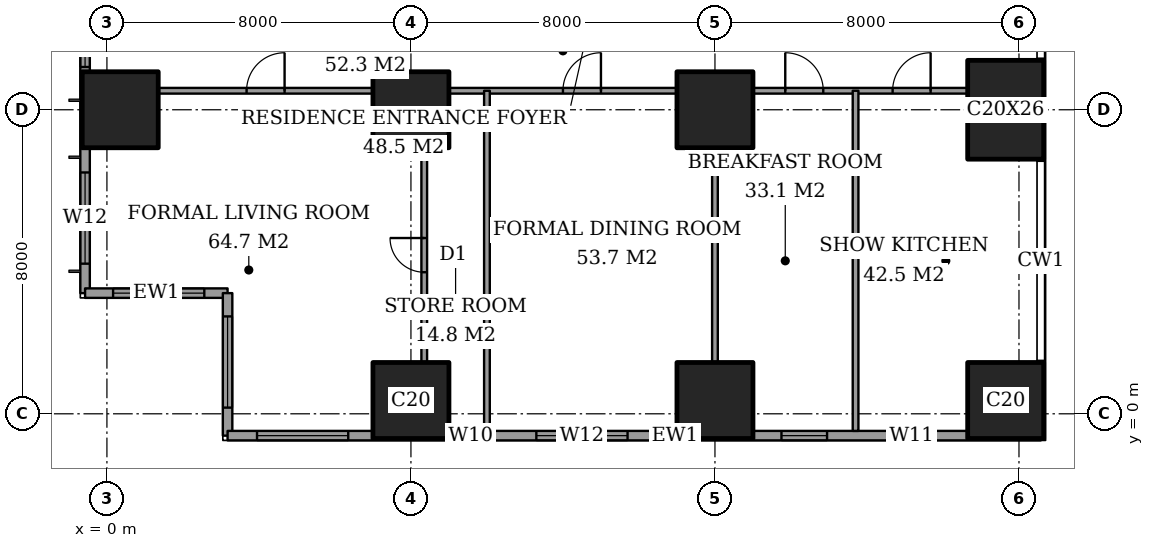
"""IFC4 building model, lengths in metres.
Left out: names, types, materials, properties, quantities, classifications, styles, units other than length and angle.
Written with IfcOpenShell. Run it as: python <this file> out.ifc"""

import sys

from ifc_helpers import new_model, si_unit, direction, frame, frame_2d, origin, origin_2d, place, context, subcontext, project, spatial, rectangle, extrude, element, fill, save


model = new_model("IFC4")
c1 = context("Model", 3, precision=1e-05, world=origin(), true_north=direction((0.0, 1.0)))
c2 = subcontext(c1, "Body", "Model", "MODEL_VIEW")
j1 = project(units=[si_unit("LENGTHUNIT", "METRE"), si_unit("PLANEANGLEUNIT", "RADIAN")], contexts=[c1])
p1 = place(None, origin())
s1 = spatial("IfcSite", under=j1, at=p1, CompositionType="ELEMENT")
p2 = place(p1, origin())
s2 = spatial("IfcBuilding", under=s1, at=p2, CompositionType="ELEMENT")
p3 = place(p2, frame((0.0, 0.0, 117.8)))
s3 = spatial("IfcBuildingStorey", under=s2, at=p3, CompositionType="ELEMENT", Elevation=117.8)
for number, where, z_axis, x_axis in (
    (1, (0.35, 8.0, 0.0), (0.0, 0.0, 1.0), (1.0, 0.0, 0.0)),
    (2, (8.0, 0.35, 0.0), (0.0, 0.0, 1.0), (1.0, 0.0, 0.0)),
    (3, (8.0, 8.0, 0.0), (0.0, 0.0, 1.0), (1.0, 0.0, 0.0)),
    (4, (16.0, 0.35, 0.0), (0.0, 0.0, 1.0), (1.0, 0.0, 0.0)),
    (5, (16.0, 8.0, 0.0), (0.0, 0.0, 1.0), (1.0, 0.0, 0.0)),
    (6, (23.65, 0.35, 0.0), (0.0, 0.0, 1.0), (1.0, 0.0, 0.0)),
):
    element("IfcColumn", number, at=place(p3, frame(where, z_axis=z_axis, x_axis=x_axis)), inside=s3, PredefinedType="COLUMN", context=c2, shape_type="SweptSolid", body=[
        extrude(rectangle(XDim=2.0, YDim=2.0, at=origin_2d()), origin(), (0.0, 0.0, 1.0), 3.6),
    ])
p4 = place(p3, frame((23.65, 8.0, 0.0), z_axis=(0.0, 0.0, 1.0), x_axis=(1.0, 0.0, 0.0)))
e7 = element("IfcColumn", 7, at=p4, inside=s3, PredefinedType="COLUMN", context=c2, shape_type="SweptSolid", body=[
    extrude(rectangle(XDim=2.0, YDim=2.6, at=origin_2d()), origin(), (0.0, 0.0, 1.0), 3.6),
])
p5 = place(p3, frame((-0.575, 44.825, 0.0), z_axis=(0.0, 0.0, 1.0), x_axis=(0.0, -1.0, 0.0)))
e8 = element("IfcWall", 8, at=p5, inside=s3, PredefinedType="SOLIDWALL", context=c2, shape_type="SweptSolid", body=[
    extrude(rectangle(XDim=41.65, YDim=0.25, at=frame_2d((20.825, 0.0))), origin(), (0.0, 0.0, 1.0), 3.6),
])
p6 = place(p5, frame((0.775, 0.0, 0.4)))
e9 = element("IfcOpeningElement", 9, at=p6, cuts=e8, PredefinedType="OPENING", context=c2, shape_type="SweptSolid", body=[
    extrude(rectangle(XDim=2.4, YDim=2.2, at=frame_2d((1.2, 1.1))), frame((0.0, 0.135, 0.0), z_axis=(0.0, -1.0, 0.0), x_axis=(1.0, 0.0, 0.0)), (0.0, 0.0, 1.0), 0.27),
])
p7 = place(p5, frame((6.1, 0.0, 0.4)))
e10 = element("IfcOpeningElement", 10, at=p7, cuts=e8, PredefinedType="OPENING", context=c2, shape_type="SweptSolid", body=[
    extrude(rectangle(XDim=1.2, YDim=2.2, at=frame_2d((0.6, 1.1))), frame((0.0, 0.135, 0.0), z_axis=(0.0, -1.0, 0.0), x_axis=(1.0, 0.0, 0.0)), (0.0, 0.0, 1.0), 0.27),
])
p8 = place(p5, frame((8.225, 0.0, 0.4)))
e11 = element("IfcOpeningElement", 11, at=p8, cuts=e8, PredefinedType="OPENING", context=c2, shape_type="SweptSolid", body=[
    extrude(rectangle(XDim=2.4, YDim=2.2, at=frame_2d((1.2, 1.1))), frame((0.0, 0.135, 0.0), z_axis=(0.0, -1.0, 0.0), x_axis=(1.0, 0.0, 0.0)), (0.0, 0.0, 1.0), 0.27),
])
p9 = place(p5, frame((15.625, 0.0, 0.4)))
e12 = element("IfcOpeningElement", 12, at=p9, cuts=e8, PredefinedType="OPENING", context=c2, shape_type="SweptSolid", body=[
    extrude(rectangle(XDim=2.4, YDim=2.2, at=frame_2d((1.2, 1.1))), frame((0.0, 0.135, 0.0), z_axis=(0.0, -1.0, 0.0), x_axis=(1.0, 0.0, 0.0)), (0.0, 0.0, 1.0), 0.27),
])
p10 = place(p5, frame((23.625, 0.0, 0.4)))
e13 = element("IfcOpeningElement", 13, at=p10, cuts=e8, PredefinedType="OPENING", context=c2, shape_type="SweptSolid", body=[
    extrude(rectangle(XDim=2.4, YDim=2.2, at=frame_2d((1.2, 1.1))), frame((0.0, 0.135, 0.0), z_axis=(0.0, -1.0, 0.0), x_axis=(1.0, 0.0, 0.0)), (0.0, 0.0, 1.0), 0.27),
])
p11 = place(p5, frame((30.825, 0.0, 0.4)))
e14 = element("IfcOpeningElement", 14, at=p11, cuts=e8, PredefinedType="OPENING", context=c2, shape_type="SweptSolid", body=[
    extrude(rectangle(XDim=2.4, YDim=2.2, at=frame_2d((1.2, 1.1))), frame((0.0, 0.135, 0.0), z_axis=(0.0, -1.0, 0.0), x_axis=(1.0, 0.0, 0.0)), (0.0, 0.0, 1.0), 0.27),
])
p12 = place(p5, frame((34.5, 0.0, 0.4)))
e15 = element("IfcOpeningElement", 15, at=p12, cuts=e8, PredefinedType="OPENING", context=c2, shape_type="SweptSolid", body=[
    extrude(rectangle(XDim=1.2, YDim=2.2, at=frame_2d((0.6, 1.1))), frame((0.0, 0.135, 0.0), z_axis=(0.0, -1.0, 0.0), x_axis=(1.0, 0.0, 0.0)), (0.0, 0.0, 1.0), 0.27),
])
p13 = place(p5, frame((38.475, 0.0, 0.4)))
e16 = element("IfcOpeningElement", 16, at=p13, cuts=e8, PredefinedType="OPENING", context=c2, shape_type="SweptSolid", body=[
    extrude(rectangle(XDim=2.4, YDim=2.2, at=frame_2d((1.2, 1.1))), frame((0.0, 0.135, 0.0), z_axis=(0.0, -1.0, 0.0), x_axis=(1.0, 0.0, 0.0)), (0.0, 0.0, 1.0), 0.27),
])
p14 = place(p3, frame((-0.575, 3.175, 0.0), z_axis=(0.0, 0.0, 1.0), x_axis=(1.0, 0.0, 0.0)))
e17 = element("IfcWall", 17, at=p14, inside=s3, PredefinedType="SOLIDWALL", context=c2, shape_type="SweptSolid", body=[
    extrude(rectangle(XDim=3.75, YDim=0.25, at=frame_2d((1.875, 0.0))), origin(), (0.0, 0.0, 1.0), 3.6),
])
p15 = place(p14, frame((0.738, 0.0, 0.4)))
e18 = element("IfcOpeningElement", 18, at=p15, cuts=e17, PredefinedType="OPENING", context=c2, shape_type="SweptSolid", body=[
    extrude(rectangle(XDim=2.4, YDim=2.2, at=frame_2d((1.2, 1.1))), frame((0.0, 0.135, 0.0), z_axis=(0.0, -1.0, 0.0), x_axis=(1.0, 0.0, 0.0)), (0.0, 0.0, 1.0), 0.27),
])
p16 = place(p3, frame((3.175, 3.175, 0.0), z_axis=(0.0, 0.0, 1.0), x_axis=(0.0, -1.0, 0.0)))
e19 = element("IfcWall", 19, at=p16, inside=s3, PredefinedType="SOLIDWALL", context=c2, shape_type="SweptSolid", body=[
    extrude(rectangle(XDim=3.75, YDim=0.25, at=frame_2d((1.875, 0.0))), origin(), (0.0, 0.0, 1.0), 3.6),
])
p17 = place(p16, frame((0.613, 0.0, 0.4)))
e20 = element("IfcOpeningElement", 20, at=p17, cuts=e19, PredefinedType="OPENING", context=c2, shape_type="SweptSolid", body=[
    extrude(rectangle(XDim=2.4, YDim=2.2, at=frame_2d((1.2, 1.1))), frame((0.0, 0.135, 0.0), z_axis=(0.0, -1.0, 0.0), x_axis=(1.0, 0.0, 0.0)), (0.0, 0.0, 1.0), 0.27),
])
p18 = place(p3, frame((3.175, -0.575, 0.0), z_axis=(0.0, 0.0, 1.0), x_axis=(1.0, 0.0, 0.0)))
e21 = element("IfcWall", 21, at=p18, inside=s3, PredefinedType="SOLIDWALL", context=c2, shape_type="SweptSolid", body=[
    extrude(rectangle(XDim=21.4, YDim=0.25, at=frame_2d((10.7, 0.0))), origin(), (0.0, 0.0, 1.0), 3.6),
])
p19 = place(p18, frame((0.775, 0.0, 0.4)))
e22 = element("IfcOpeningElement", 22, at=p19, cuts=e21, PredefinedType="OPENING", context=c2, shape_type="SweptSolid", body=[
    extrude(rectangle(XDim=2.4, YDim=2.2, at=frame_2d((1.2, 1.1))), frame((0.0, 0.135, 0.0), z_axis=(0.0, -1.0, 0.0), x_axis=(1.0, 0.0, 0.0)), (0.0, 0.0, 1.0), 0.27),
])
p20 = place(p18, frame((6.1, 0.0, 0.4)))
e23 = element("IfcOpeningElement", 23, at=p20, cuts=e21, PredefinedType="OPENING", context=c2, shape_type="SweptSolid", body=[
    extrude(rectangle(XDim=0.6, YDim=2.2, at=frame_2d((0.3, 1.1))), frame((0.0, 0.135, 0.0), z_axis=(0.0, -1.0, 0.0), x_axis=(1.0, 0.0, 0.0)), (0.0, 0.0, 1.0), 0.27),
])
p21 = place(p18, frame((8.125, 0.0, 0.4)))
e24 = element("IfcOpeningElement", 24, at=p21, cuts=e21, PredefinedType="OPENING", context=c2, shape_type="SweptSolid", body=[
    extrude(rectangle(XDim=2.4, YDim=2.2, at=frame_2d((1.2, 1.1))), frame((0.0, 0.135, 0.0), z_axis=(0.0, -1.0, 0.0), x_axis=(1.0, 0.0, 0.0)), (0.0, 0.0, 1.0), 0.27),
])
p22 = place(p18, frame((14.575, 0.0, 0.4)))
e25 = element("IfcOpeningElement", 25, at=p22, cuts=e21, PredefinedType="OPENING", context=c2, shape_type="SweptSolid", body=[
    extrude(rectangle(XDim=1.2, YDim=2.2, at=frame_2d((0.6, 1.1))), frame((0.0, 0.135, 0.0), z_axis=(0.0, -1.0, 0.0), x_axis=(1.0, 0.0, 0.0)), (0.0, 0.0, 1.0), 0.27),
])
p23 = place(p18, frame((17.4, 0.0, 0.4)))
e26 = element("IfcOpeningElement", 26, at=p23, cuts=e21, PredefinedType="OPENING", context=c2, shape_type="SweptSolid", body=[
    extrude(rectangle(XDim=1.2, YDim=2.2, at=frame_2d((0.6, 1.1))), frame((0.0, 0.135, 0.0), z_axis=(0.0, -1.0, 0.0), x_axis=(1.0, 0.0, 0.0)), (0.0, 0.0, 1.0), 0.27),
])
p24 = place(p3, frame((1.35, 8.5, 0.0), z_axis=(0.0, 0.0, 1.0), x_axis=(1.0, 0.0, 0.0)))
e27 = element("IfcWall", 27, at=p24, inside=s3, PredefinedType="PARTITIONING", context=c2, shape_type="SweptSolid", body=[
    extrude(rectangle(XDim=5.65, YDim=0.15, at=frame_2d((2.825, 0.0))), origin(), (0.0, 0.0, 1.0), 3.35),
])
p25 = place(p24, frame((2.325, 0.0, 0.0)))
e28 = element("IfcOpeningElement", 28, at=p25, cuts=e27, PredefinedType="OPENING", context=c2, shape_type="SweptSolid", body=[
    extrude(rectangle(XDim=1.0, YDim=2.1, at=frame_2d((0.5, 1.05))), frame((0.0, 0.085, 0.0), z_axis=(0.0, -1.0, 0.0), x_axis=(1.0, 0.0, 0.0)), (0.0, 0.0, 1.0), 0.17),
])
p26 = place(p3, frame((9.0, 8.5, 0.0), z_axis=(0.0, 0.0, 1.0), x_axis=(1.0, 0.0, 0.0)))
e29 = element("IfcWall", 29, at=p26, inside=s3, PredefinedType="PARTITIONING", context=c2, shape_type="SweptSolid", body=[
    extrude(rectangle(XDim=6.0, YDim=0.15, at=frame_2d((3.0, 0.0))), origin(), (0.0, 0.0, 1.0), 3.35),
])
p27 = place(p26, frame((3.0, 0.0, 0.0)))
e30 = element("IfcOpeningElement", 30, at=p27, cuts=e29, PredefinedType="OPENING", context=c2, shape_type="SweptSolid", body=[
    extrude(rectangle(XDim=1.0, YDim=2.1, at=frame_2d((0.5, 1.05))), frame((0.0, 0.085, 0.0), z_axis=(0.0, -1.0, 0.0), x_axis=(1.0, 0.0, 0.0)), (0.0, 0.0, 1.0), 0.17),
])
p28 = place(p3, frame((17.0, 8.5, 0.0), z_axis=(0.0, 0.0, 1.0), x_axis=(1.0, 0.0, 0.0)))
e31 = element("IfcWall", 31, at=p28, inside=s3, PredefinedType="PARTITIONING", context=c2, shape_type="SweptSolid", body=[
    extrude(rectangle(XDim=5.65, YDim=0.15, at=frame_2d((2.825, 0.0))), origin(), (0.0, 0.0, 1.0), 3.35),
])
p29 = place(p28, frame((0.85, 0.0, 0.0)))
e32 = element("IfcOpeningElement", 32, at=p29, cuts=e31, PredefinedType="OPENING", context=c2, shape_type="SweptSolid", body=[
    extrude(rectangle(XDim=1.0, YDim=2.1, at=frame_2d((0.5, 1.05))), frame((0.0, 0.085, 0.0), z_axis=(0.0, -1.0, 0.0), x_axis=(1.0, 0.0, 0.0)), (0.0, 0.0, 1.0), 0.17),
])
p30 = place(p28, frame((3.675, 0.0, 0.0)))
e33 = element("IfcOpeningElement", 33, at=p30, cuts=e31, PredefinedType="OPENING", context=c2, shape_type="SweptSolid", body=[
    extrude(rectangle(XDim=1.0, YDim=2.1, at=frame_2d((0.5, 1.05))), frame((0.0, 0.085, 0.0), z_axis=(0.0, -1.0, 0.0), x_axis=(1.0, 0.0, 0.0)), (0.0, 0.0, 1.0), 0.17),
])
p31 = place(p3, frame((8.35, 1.35, 0.0), z_axis=(0.0, 0.0, 1.0), x_axis=(0.0, 1.0, 0.0)))
e34 = element("IfcWall", 34, at=p31, inside=s3, PredefinedType="PARTITIONING", context=c2, shape_type="SweptSolid", body=[
    extrude(rectangle(XDim=5.65, YDim=0.15, at=frame_2d((2.825, 0.0))), origin(), (0.0, 0.0, 1.0), 3.35),
])
p32 = place(p31, frame((2.375, 0.0, 0.0)))
e35 = element("IfcOpeningElement", 35, at=p32, cuts=e34, PredefinedType="OPENING", context=c2, shape_type="SweptSolid", body=[
    extrude(rectangle(XDim=0.9, YDim=2.1, at=frame_2d((0.45, 1.05))), frame((0.0, 0.085, 0.0), z_axis=(0.0, -1.0, 0.0), x_axis=(1.0, 0.0, 0.0)), (0.0, 0.0, 1.0), 0.17),
])
p33 = place(p3, frame((10.0, -0.45, 0.0), z_axis=(0.0, 0.0, 1.0), x_axis=(0.0, 1.0, 0.0)))
e36 = element("IfcWall", 36, at=p33, inside=s3, PredefinedType="PARTITIONING", context=c2, shape_type="SweptSolid", body=[
    extrude(rectangle(XDim=8.95, YDim=0.15, at=frame_2d((4.475, 0.0))), origin(), (0.0, 0.0, 1.0), 3.35),
])
p34 = place(p3, frame((16.0, 1.35, 0.0), z_axis=(0.0, 0.0, 1.0), x_axis=(0.0, 1.0, 0.0)))
e37 = element("IfcWall", 37, at=p34, inside=s3, PredefinedType="PARTITIONING", context=c2, shape_type="SweptSolid", body=[
    extrude(rectangle(XDim=5.65, YDim=0.15, at=frame_2d((2.825, 0.0))), origin(), (0.0, 0.0, 1.0), 3.35),
])
p35 = place(p3, frame((19.7, -0.45, 0.0), z_axis=(0.0, 0.0, 1.0), x_axis=(0.0, 1.0, 0.0)))
e38 = element("IfcWall", 38, at=p35, inside=s3, PredefinedType="PARTITIONING", context=c2, shape_type="SweptSolid", body=[
    extrude(rectangle(XDim=8.95, YDim=0.15, at=frame_2d((4.475, 0.0))), origin(), (0.0, 0.0, 1.0), 3.35),
])
p36 = place(p12, origin())
e39 = element("IfcWindow", 39, at=p36, inside=s3, PartitioningType="SINGLE_PANEL", PredefinedType="WINDOW", context=c2, shape_type="SweptSolid", body=[
    extrude(rectangle(XDim=1.2, YDim=2.2, at=frame_2d((0.6, 1.1))), frame((0.0, 0.03, 0.0), z_axis=(0.0, -1.0, 0.0), x_axis=(1.0, 0.0, 0.0)), (0.0, 0.0, 1.0), 0.06),
])
fill(e15, e39)
p37 = place(p13, origin())
e40 = element("IfcWindow", 40, at=p37, inside=s3, PartitioningType="SINGLE_PANEL", PredefinedType="WINDOW", context=c2, shape_type="SweptSolid", body=[
    extrude(rectangle(XDim=2.4, YDim=2.2, at=frame_2d((1.2, 1.1))), frame((0.0, 0.03, 0.0), z_axis=(0.0, -1.0, 0.0), x_axis=(1.0, 0.0, 0.0)), (0.0, 0.0, 1.0), 0.06),
])
fill(e16, e40)
p38 = place(p15, origin())
e41 = element("IfcWindow", 41, at=p38, inside=s3, PartitioningType="SINGLE_PANEL", PredefinedType="WINDOW", context=c2, shape_type="SweptSolid", body=[
    extrude(rectangle(XDim=2.4, YDim=2.2, at=frame_2d((1.2, 1.1))), frame((0.0, 0.03, 0.0), z_axis=(0.0, -1.0, 0.0), x_axis=(1.0, 0.0, 0.0)), (0.0, 0.0, 1.0), 0.06),
])
fill(e18, e41)
p39 = place(p17, origin())
e42 = element("IfcWindow", 42, at=p39, inside=s3, PartitioningType="SINGLE_PANEL", PredefinedType="WINDOW", context=c2, shape_type="SweptSolid", body=[
    extrude(rectangle(XDim=2.4, YDim=2.2, at=frame_2d((1.2, 1.1))), frame((0.0, 0.03, 0.0), z_axis=(0.0, -1.0, 0.0), x_axis=(1.0, 0.0, 0.0)), (0.0, 0.0, 1.0), 0.06),
])
fill(e20, e42)
p40 = place(p19, origin())
e43 = element("IfcWindow", 43, at=p40, inside=s3, PartitioningType="SINGLE_PANEL", PredefinedType="WINDOW", context=c2, shape_type="SweptSolid", body=[
    extrude(rectangle(XDim=2.4, YDim=2.2, at=frame_2d((1.2, 1.1))), frame((0.0, 0.03, 0.0), z_axis=(0.0, -1.0, 0.0), x_axis=(1.0, 0.0, 0.0)), (0.0, 0.0, 1.0), 0.06),
])
fill(e22, e43)
p41 = place(p20, origin())
e44 = element("IfcWindow", 44, at=p41, inside=s3, PartitioningType="SINGLE_PANEL", PredefinedType="WINDOW", context=c2, shape_type="SweptSolid", body=[
    extrude(rectangle(XDim=0.6, YDim=2.2, at=frame_2d((0.3, 1.1))), frame((0.0, 0.03, 0.0), z_axis=(0.0, -1.0, 0.0), x_axis=(1.0, 0.0, 0.0)), (0.0, 0.0, 1.0), 0.06),
])
fill(e23, e44)
p42 = place(p21, origin())
e45 = element("IfcWindow", 45, at=p42, inside=s3, PartitioningType="SINGLE_PANEL", PredefinedType="WINDOW", context=c2, shape_type="SweptSolid", body=[
    extrude(rectangle(XDim=2.4, YDim=2.2, at=frame_2d((1.2, 1.1))), frame((0.0, 0.03, 0.0), z_axis=(0.0, -1.0, 0.0), x_axis=(1.0, 0.0, 0.0)), (0.0, 0.0, 1.0), 0.06),
])
fill(e24, e45)
p43 = place(p22, origin())
e46 = element("IfcWindow", 46, at=p43, inside=s3, PartitioningType="SINGLE_PANEL", PredefinedType="WINDOW", context=c2, shape_type="SweptSolid", body=[
    extrude(rectangle(XDim=1.2, YDim=2.2, at=frame_2d((0.6, 1.1))), frame((0.0, 0.03, 0.0), z_axis=(0.0, -1.0, 0.0), x_axis=(1.0, 0.0, 0.0)), (0.0, 0.0, 1.0), 0.06),
])
fill(e25, e46)
p44 = place(p23, origin())
e47 = element("IfcWindow", 47, at=p44, inside=s3, PartitioningType="SINGLE_PANEL", PredefinedType="WINDOW", context=c2, shape_type="SweptSolid", body=[
    extrude(rectangle(XDim=1.2, YDim=2.2, at=frame_2d((0.6, 1.1))), frame((0.0, 0.03, 0.0), z_axis=(0.0, -1.0, 0.0), x_axis=(1.0, 0.0, 0.0)), (0.0, 0.0, 1.0), 0.06),
])
fill(e26, e47)
p45 = place(p25, origin())
e48 = element("IfcDoor", 48, at=p45, inside=s3, OperationType="SINGLE_SWING_LEFT", PredefinedType="DOOR", context=c2, shape_type="SweptSolid", body=[
    extrude(rectangle(XDim=1.0, YDim=2.1, at=frame_2d((0.5, 1.05))), frame((0.0, 0.025, 0.0), z_axis=(0.0, -1.0, 0.0), x_axis=(1.0, 0.0, 0.0)), (0.0, 0.0, 1.0), 0.05),
])
fill(e28, e48)
p46 = place(p32, origin())
e49 = element("IfcDoor", 49, at=p46, inside=s3, OperationType="SINGLE_SWING_LEFT", PredefinedType="DOOR", context=c2, shape_type="SweptSolid", body=[
    extrude(rectangle(XDim=0.9, YDim=2.1, at=frame_2d((0.45, 1.05))), frame((0.0, 0.025, 0.0), z_axis=(0.0, -1.0, 0.0), x_axis=(1.0, 0.0, 0.0)), (0.0, 0.0, 1.0), 0.05),
])
fill(e35, e49)
p47 = place(p27, origin())
e50 = element("IfcDoor", 50, at=p47, inside=s3, OperationType="SINGLE_SWING_LEFT", PredefinedType="DOOR", context=c2, shape_type="SweptSolid", body=[
    extrude(rectangle(XDim=1.0, YDim=2.1, at=frame_2d((0.5, 1.05))), frame((0.0, 0.025, 0.0), z_axis=(0.0, -1.0, 0.0), x_axis=(1.0, 0.0, 0.0)), (0.0, 0.0, 1.0), 0.05),
])
fill(e30, e50)
p48 = place(p29, origin())
e51 = element("IfcDoor", 51, at=p48, inside=s3, OperationType="SINGLE_SWING_RIGHT", PredefinedType="DOOR", context=c2, shape_type="SweptSolid", body=[
    extrude(rectangle(XDim=1.0, YDim=2.1, at=frame_2d((0.5, 1.05))), frame((0.0, 0.025, 0.0), z_axis=(0.0, -1.0, 0.0), x_axis=(1.0, 0.0, 0.0)), (0.0, 0.0, 1.0), 0.05),
])
fill(e32, e51)
p49 = place(p30, origin())
e52 = element("IfcDoor", 52, at=p49, inside=s3, OperationType="SINGLE_SWING_LEFT", PredefinedType="DOOR", context=c2, shape_type="SweptSolid", body=[
    extrude(rectangle(XDim=1.0, YDim=2.1, at=frame_2d((0.5, 1.05))), frame((0.0, 0.025, 0.0), z_axis=(0.0, -1.0, 0.0), x_axis=(1.0, 0.0, 0.0)), (0.0, 0.0, 1.0), 0.05),
])
fill(e33, e52)
save(model, sys.argv[1])
